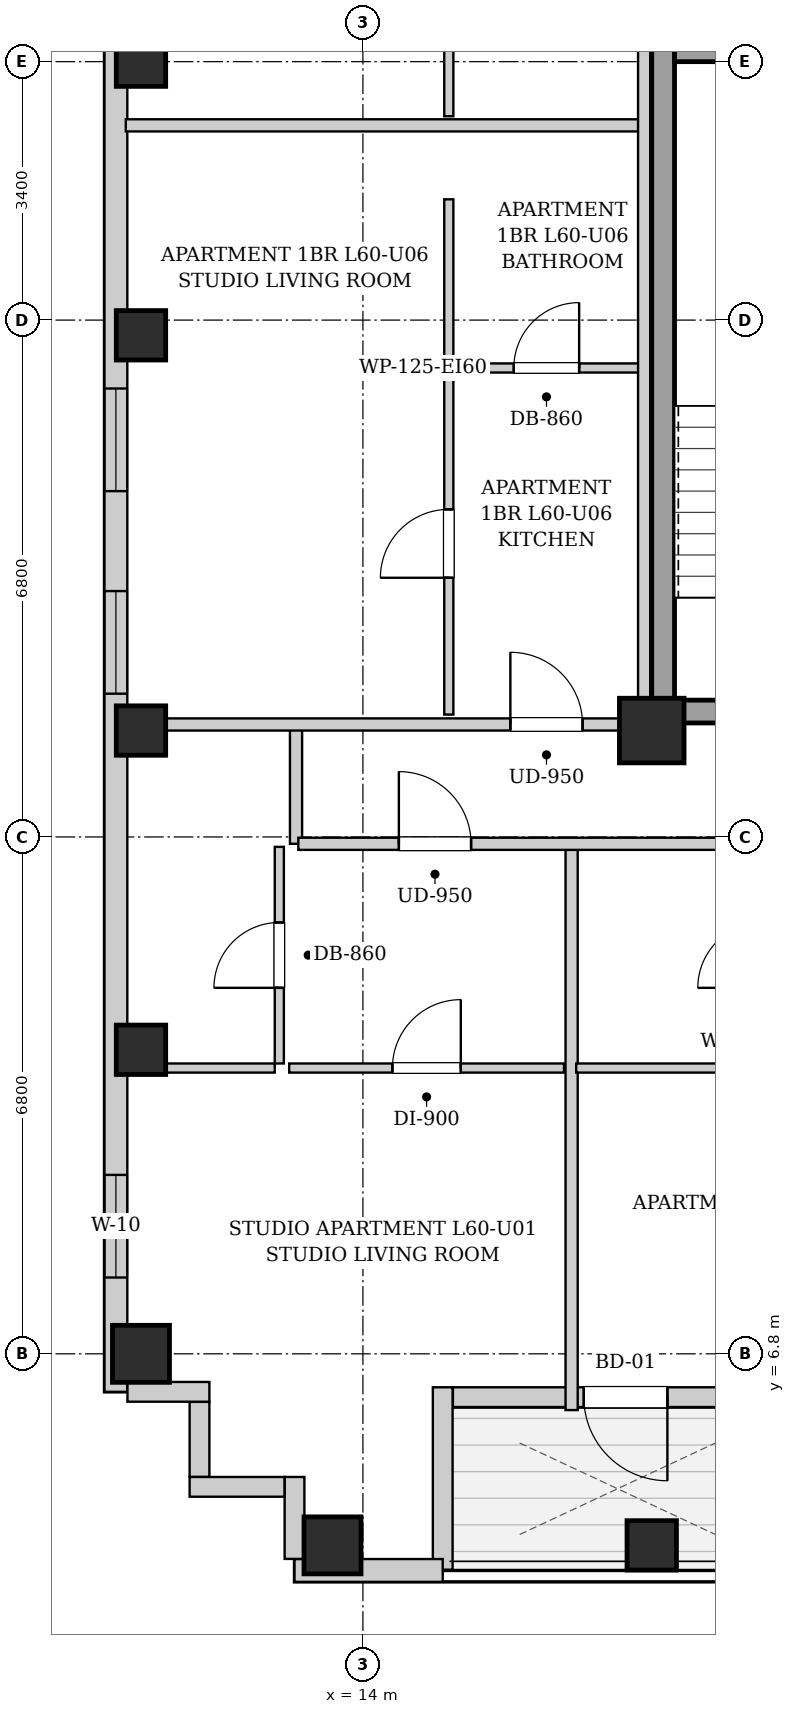
"""IFC4 building model, lengths in metres.
Left out: names, types, materials, properties, quantities, classifications, styles, units other than length and angle.
Written with IfcOpenShell. Run it as: python <this file> out.ifc"""

import sys

from ifc_helpers import new_model, si_unit, direction, frame, frame_2d, origin, origin_2d, place, context, subcontext, project, spatial, rectangle, extrude, element, fill, save


model = new_model("IFC4")
c1 = context("Model", 3, precision=1e-05, world=origin(), true_north=direction((0.0, 1.0)))
c2 = subcontext(c1, "Body", "Model", "MODEL_VIEW")
j1 = project(units=[si_unit("LENGTHUNIT", "METRE"), si_unit("PLANEANGLEUNIT", "RADIAN")], contexts=[c1])
p1 = place(None, origin())
s1 = spatial("IfcSite", under=j1, at=p1, CompositionType="ELEMENT")
p2 = place(p1, origin())
s2 = spatial("IfcBuilding", under=s1, at=p2, CompositionType="ELEMENT")
p3 = place(p2, frame((0.0, 0.0, 207.4)))
s3 = spatial("IfcBuildingStorey", under=s2, at=p3, CompositionType="ELEMENT", Elevation=207.4)
p4 = place(p3, frame((13.6, 4.28, 0.0), z_axis=(0.0, 0.0, 1.0), x_axis=(1.0, 0.0, 0.0)))
e1 = element("IfcColumn", 1, at=p4, inside=s3, PredefinedType="COLUMN", context=c2, shape_type="SweptSolid", body=[
    extrude(rectangle(XDim=0.75, YDim=0.75, at=origin_2d()), origin(), (0.0, 0.0, 1.0), 3.3),
])
p5 = place(p3, frame((17.8, 4.28, 0.0), z_axis=(0.0, 0.0, 1.0), x_axis=(1.0, 0.0, 0.0)))
e2 = element("IfcColumn", 2, at=p5, inside=s3, PredefinedType="COLUMN", context=c2, shape_type="SweptSolid", body=[
    extrude(rectangle(XDim=0.65, YDim=0.65, at=origin_2d()), origin(), (0.0, 0.0, 1.0), 3.3),
])
p6 = place(p3, frame((11.08, 6.8, 0.0), z_axis=(0.0, 0.0, 1.0), x_axis=(1.0, 0.0, 0.0)))
e3 = element("IfcColumn", 3, at=p6, inside=s3, PredefinedType="COLUMN", context=c2, shape_type="SweptSolid", body=[
    extrude(rectangle(XDim=0.75, YDim=0.75, at=origin_2d()), origin(), (0.0, 0.0, 1.0), 3.3),
])
for number, where, z_axis, x_axis in (
    (4, (11.08, 10.8, 0.0), (0.0, 0.0, 1.0), (1.0, 0.0, 0.0)),
    (5, (11.08, 15.0, 0.0), (0.0, 0.0, 1.0), (1.0, 0.0, 0.0)),
    (6, (11.08, 20.2, 0.0), (0.0, 0.0, 1.0), (1.0, 0.0, 0.0)),
    (7, (11.08, 23.8, 0.0), (0.0, 0.0, 1.0), (1.0, 0.0, 0.0)),
):
    element("IfcColumn", number, at=place(p3, frame(where, z_axis=z_axis, x_axis=x_axis)), inside=s3, PredefinedType="COLUMN", context=c2, shape_type="SweptSolid", body=[
        extrude(rectangle(XDim=0.65, YDim=0.65, at=origin_2d()), origin(), (0.0, 0.0, 1.0), 3.3),
    ])
p7 = place(p3, frame((17.8, 15.0, 0.0), z_axis=(0.0, 0.0, 1.0), x_axis=(1.0, 0.0, 0.0)))
e8 = element("IfcColumn", 8, at=p7, inside=s3, PredefinedType="COLUMN", context=c2, shape_type="SweptSolid", body=[
    extrude(rectangle(XDim=0.85, YDim=0.85, at=origin_2d()), origin(), (0.0, 0.0, 1.0), 3.3),
])
p8 = place(p3, frame((19.516, 6.23, 0.0), z_axis=(0.0, 0.0, 1.0), x_axis=(-1.0, 0.0, 0.0)))
e9 = element("IfcWall", 9, at=p8, inside=s3, PredefinedType="SOLIDWALL", context=c2, shape_type="SweptSolid", body=[
    extrude(rectangle(XDim=4.332, YDim=0.26, at=frame_2d((2.166, 0.0))), origin(), (0.0, 0.0, 1.0), 3.04),
])
p9 = place(p8, frame((1.51, 0.0, 0.0)))
e10 = element("IfcOpeningElement", 10, at=p9, cuts=e9, PredefinedType="OPENING", context=c2, shape_type="SweptSolid", body=[
    extrude(rectangle(XDim=1.1, YDim=2.0, at=frame_2d((0.55, 1.0))), frame((0.0, 0.14, 0.0), z_axis=(0.0, -1.0, 0.0), x_axis=(1.0, 0.0, 0.0)), (0.0, 0.0, 1.0), 0.28),
])
p10 = place(p3, frame((15.05, 6.36, 0.0), z_axis=(0.0, 0.0, 1.0), x_axis=(0.0, -1.0, 0.0)))
e11 = element("IfcWall", 11, at=p10, inside=s3, PredefinedType="SOLIDWALL", context=c2, shape_type="SweptSolid", body=[
    extrude(rectangle(XDim=2.4, YDim=0.26, at=frame_2d((1.2, 0.0))), origin(), (0.0, 0.0, 1.0), 3.04),
])
p11 = place(p3, frame((15.05, 3.95, 0.0), z_axis=(0.0, 0.0, 1.0), x_axis=(-1.0, 0.0, 0.0)))
e12 = element("IfcWall", 12, at=p11, inside=s3, PredefinedType="SOLIDWALL", context=c2, shape_type="SweptSolid", body=[
    extrude(rectangle(XDim=1.95, YDim=0.3, at=frame_2d((0.975, 0.0))), origin(), (0.0, 0.0, 1.0), 3.04),
])
p12 = place(p3, frame((10.75, 6.3, 0.0), z_axis=(0.0, 0.0, 1.0), x_axis=(0.0, 1.0, 0.0)))
e13 = element("IfcWall", 13, at=p12, inside=s3, PredefinedType="SOLIDWALL", context=c2, shape_type="SweptSolid", body=[
    extrude(rectangle(XDim=31.4, YDim=0.3, at=frame_2d((15.7, 0.0))), origin(), (0.0, 0.0, 1.0), 3.04),
])
p13 = place(p12, frame((1.504, 0.0, 0.55)))
e14 = element("IfcOpeningElement", 14, at=p13, cuts=e13, PredefinedType="OPENING", context=c2, shape_type="SweptSolid", body=[
    extrude(rectangle(XDim=1.35, YDim=1.2, at=frame_2d((0.675, 0.6))), frame((0.0, 0.16, 0.0), z_axis=(0.0, -1.0, 0.0), x_axis=(1.0, 0.0, 0.0)), (0.0, 0.0, 1.0), 0.32),
])
p14 = place(p12, frame((28.546, 0.0, 0.55)))
e15 = element("IfcOpeningElement", 15, at=p14, cuts=e13, PredefinedType="OPENING", context=c2, shape_type="SweptSolid", body=[
    extrude(rectangle(XDim=1.35, YDim=1.2, at=frame_2d((0.675, 0.6))), frame((0.0, 0.16, 0.0), z_axis=(0.0, -1.0, 0.0), x_axis=(1.0, 0.0, 0.0)), (0.0, 0.0, 1.0), 0.32),
])
p15 = place(p12, frame((11.85, 0.0, 0.55)))
e16 = element("IfcOpeningElement", 16, at=p15, cuts=e13, PredefinedType="OPENING", context=c2, shape_type="SweptSolid", body=[
    extrude(rectangle(XDim=1.35, YDim=1.2, at=frame_2d((0.675, 0.6))), frame((0.0, 0.16, 0.0), z_axis=(0.0, -1.0, 0.0), x_axis=(1.0, 0.0, 0.0)), (0.0, 0.0, 1.0), 0.32),
])
p16 = place(p12, frame((9.185, 0.0, 0.55)))
e17 = element("IfcOpeningElement", 17, at=p16, cuts=e13, PredefinedType="OPENING", context=c2, shape_type="SweptSolid", body=[
    extrude(rectangle(XDim=1.35, YDim=1.2, at=frame_2d((0.675, 0.6))), frame((0.0, 0.16, 0.0), z_axis=(0.0, -1.0, 0.0), x_axis=(1.0, 0.0, 0.0)), (0.0, 0.0, 1.0), 0.32),
])
p17 = place(p12, frame((19.006, 0.0, 0.55)))
e18 = element("IfcOpeningElement", 18, at=p17, cuts=e13, PredefinedType="OPENING", context=c2, shape_type="SweptSolid", body=[
    extrude(rectangle(XDim=1.35, YDim=1.2, at=frame_2d((0.675, 0.6))), frame((0.0, 0.16, 0.0), z_axis=(0.0, -1.0, 0.0), x_axis=(1.0, 0.0, 0.0)), (0.0, 0.0, 1.0), 0.32),
])
p18 = place(p12, frame((20.616, 0.0, 0.55)))
e19 = element("IfcOpeningElement", 19, at=p18, cuts=e13, PredefinedType="OPENING", context=c2, shape_type="SweptSolid", body=[
    extrude(rectangle(XDim=1.35, YDim=1.2, at=frame_2d((0.675, 0.6))), frame((0.0, 0.16, 0.0), z_axis=(0.0, -1.0, 0.0), x_axis=(1.0, 0.0, 0.0)), (0.0, 0.0, 1.0), 0.32),
])
p19 = place(p3, frame((13.1, 4.102, 0.0), z_axis=(0.0, 0.0, 1.0), x_axis=(0.0, 1.0, 0.0)))
e20 = element("IfcWall", 20, at=p19, inside=s3, PredefinedType="SOLIDWALL", context=c2, shape_type="SweptSolid", body=[
    extrude(rectangle(XDim=1.078, YDim=0.26, at=frame_2d((0.539, 0.0))), origin(), (0.0, 0.0, 1.0), 3.04),
])
p20 = place(p3, frame((12.968, 5.05, 0.0), z_axis=(0.0, 0.0, 1.0), x_axis=(-1.0, 0.0, 0.0)))
e21 = element("IfcWall", 21, at=p20, inside=s3, PredefinedType="SOLIDWALL", context=c2, shape_type="SweptSolid", body=[
    extrude(rectangle(XDim=1.248, YDim=0.26, at=frame_2d((0.624, 0.0))), origin(), (0.0, 0.0, 1.0), 3.04),
])
p21 = place(p3, frame((11.85, 5.182, 0.0), z_axis=(0.0, 0.0, 1.0), x_axis=(0.0, 1.0, 0.0)))
e22 = element("IfcWall", 22, at=p21, inside=s3, PredefinedType="SOLIDWALL", context=c2, shape_type="SweptSolid", body=[
    extrude(rectangle(XDim=0.986, YDim=0.26, at=frame_2d((0.493, 0.0))), origin(), (0.0, 0.0, 1.0), 3.04),
])
p22 = place(p3, frame((11.98, 6.3, 0.0), z_axis=(0.0, 0.0, 1.0), x_axis=(-1.0, 0.0, 0.0)))
e23 = element("IfcWall", 23, at=p22, inside=s3, PredefinedType="SOLIDWALL", context=c2, shape_type="SweptSolid", body=[
    extrude(rectangle(XDim=1.078, YDim=0.26, at=frame_2d((0.539, 0.0))), origin(), (0.0, 0.0, 1.0), 3.04),
])
p23 = place(p3, frame((17.95, 15.1, 0.0), z_axis=(0.0, 0.0, 1.0), x_axis=(0.0, 1.0, 0.0)))
e24 = element("IfcWall", 24, at=p23, inside=s3, PredefinedType="SHEAR", context=c2, shape_type="SweptSolid", body=[
    extrude(rectangle(XDim=9.0, YDim=0.3, at=frame_2d((4.5, 0.0))), origin(), (0.0, 0.0, 1.0), 3.04),
])
p24 = place(p3, frame((18.1, 23.95, 0.0), z_axis=(0.0, 0.0, 1.0), x_axis=(1.0, 0.0, 0.0)))
e25 = element("IfcWall", 25, at=p24, inside=s3, PredefinedType="SHEAR", context=c2, shape_type="SweptSolid", body=[
    extrude(rectangle(XDim=2.85, YDim=0.3, at=frame_2d((1.425, 0.0))), origin(), (0.0, 0.0, 1.0), 3.04),
])
p25 = place(p3, frame((18.1, 15.25, 0.0), z_axis=(0.0, 0.0, 1.0), x_axis=(1.0, 0.0, 0.0)))
e26 = element("IfcWall", 26, at=p25, inside=s3, PredefinedType="SHEAR", context=c2, shape_type="SweptSolid", body=[
    extrude(rectangle(XDim=2.85, YDim=0.3, at=frame_2d((1.425, 0.0))), origin(), (0.0, 0.0, 1.0), 3.04),
])
p26 = place(p25, frame((0.86, 0.0, 0.0)))
e27 = element("IfcOpeningElement", 27, at=p26, cuts=e26, PredefinedType="OPENING", context=c2, shape_type="SweptSolid", body=[
    extrude(rectangle(XDim=1.1, YDim=2.05, at=frame_2d((0.55, 1.025))), frame((0.0, 0.16, 0.0), z_axis=(0.0, -1.0, 0.0), x_axis=(1.0, 0.0, 0.0)), (0.0, 0.0, 1.0), 0.32),
])
p27 = place(p3, frame((13.12, 13.51, 0.0), z_axis=(0.0, 0.0, 1.0), x_axis=(0.0, 1.0, 0.0)))
e28 = element("IfcWall", 28, at=p27, inside=s3, PredefinedType="PARTITIONING", context=c2, shape_type="SweptSolid", body=[
    extrude(rectangle(XDim=1.58, YDim=0.16, at=frame_2d((0.79, 0.0))), origin(), (0.0, 0.0, 1.0), 3.04),
])
p28 = place(p3, frame((12.9, 10.62, 0.0), z_axis=(0.0, 0.0, 1.0), x_axis=(0.0, 1.0, 0.0)))
e29 = element("IfcWall", 29, at=p28, inside=s3, PredefinedType="PARTITIONING", context=c2, shape_type="SweptSolid", body=[
    extrude(rectangle(XDim=2.85, YDim=0.12, at=frame_2d((1.425, 0.0))), origin(), (0.0, 0.0, 1.0), 3.04),
])
p29 = place(p28, frame((0.995, 0.0, 0.0)))
e30 = element("IfcOpeningElement", 30, at=p29, cuts=e29, PredefinedType="OPENING", context=c2, shape_type="SweptSolid", body=[
    extrude(rectangle(XDim=0.86, YDim=2.05, at=frame_2d((0.43, 1.025))), frame((0.0, 0.07, 0.0), z_axis=(0.0, -1.0, 0.0), x_axis=(1.0, 0.0, 0.0)), (0.0, 0.0, 1.0), 0.14),
])
p30 = place(p3, frame((10.99, 10.56, 0.0), z_axis=(0.0, 0.0, 1.0), x_axis=(1.0, 0.0, 0.0)))
e31 = element("IfcWall", 31, at=p30, inside=s3, PredefinedType="PARTITIONING", context=c2, shape_type="SweptSolid", body=[
    extrude(rectangle(XDim=1.85, YDim=0.12, at=frame_2d((0.925, 0.0))), origin(), (0.0, 0.0, 1.0), 3.04),
])
p31 = place(p3, frame((13.03, 10.56, 0.0), z_axis=(0.0, 0.0, 1.0), x_axis=(1.0, 0.0, 0.0)))
e32 = element("IfcWall", 32, at=p31, inside=s3, PredefinedType="PARTITIONING", context=c2, shape_type="SweptSolid", body=[
    extrude(rectangle(XDim=3.616, YDim=0.12, at=frame_2d((1.808, 0.0))), origin(), (0.0, 0.0, 1.0), 3.04),
])
p32 = place(p31, frame((1.358, 0.0, 0.0)))
e33 = element("IfcOpeningElement", 33, at=p32, cuts=e32, PredefinedType="OPENING", context=c2, shape_type="SweptSolid", body=[
    extrude(rectangle(XDim=0.9, YDim=2.05, at=frame_2d((0.45, 1.025))), frame((0.0, 0.07, 0.0), z_axis=(0.0, -1.0, 0.0), x_axis=(1.0, 0.0, 0.0)), (0.0, 0.0, 1.0), 0.14),
])
p33 = place(p3, frame((16.746, 6.06, 0.0), z_axis=(0.0, 0.0, 1.0), x_axis=(0.0, 1.0, 0.0)))
e34 = element("IfcWall", 34, at=p33, inside=s3, PredefinedType="PARTITIONING", context=c2, shape_type="SweptSolid", body=[
    extrude(rectangle(XDim=7.41, YDim=0.16, at=frame_2d((3.705, 0.0))), origin(), (0.0, 0.0, 1.0), 3.04),
])
p34 = place(p3, frame((16.806, 10.56, 0.0), z_axis=(0.0, 0.0, 1.0), x_axis=(1.0, 0.0, 0.0)))
e35 = element("IfcWall", 35, at=p34, inside=s3, PredefinedType="PARTITIONING", context=c2, shape_type="SweptSolid", body=[
    extrude(rectangle(XDim=2.4, YDim=0.12, at=frame_2d((1.2, 0.0))), origin(), (0.0, 0.0, 1.0), 3.04),
])
p35 = place(p3, frame((10.88, 15.08, 0.0), z_axis=(0.0, 0.0, 1.0), x_axis=(1.0, 0.0, 0.0)))
e36 = element("IfcWall", 36, at=p35, inside=s3, PredefinedType="PARTITIONING", context=c2, shape_type="SweptSolid", body=[
    extrude(rectangle(XDim=6.88, YDim=0.16, at=frame_2d((3.44, 0.0))), origin(), (0.0, 0.0, 1.0), 2.556),
])
p36 = place(p35, frame((5.06, 0.0, 0.0)))
e37 = element("IfcOpeningElement", 37, at=p36, cuts=e36, PredefinedType="OPENING", context=c2, shape_type="SweptSolid", body=[
    extrude(rectangle(XDim=0.95, YDim=2.1, at=frame_2d((0.475, 1.05))), frame((0.0, 0.09, 0.0), z_axis=(0.0, -1.0, 0.0), x_axis=(1.0, 0.0, 0.0)), (0.0, 0.0, 1.0), 0.18),
])
p37 = place(p3, frame((10.88, 22.962, 0.0), z_axis=(0.0, 0.0, 1.0), x_axis=(1.0, 0.0, 0.0)))
e38 = element("IfcWall", 38, at=p37, inside=s3, PredefinedType="PARTITIONING", context=c2, shape_type="SweptSolid", body=[
    extrude(rectangle(XDim=6.76, YDim=0.16, at=frame_2d((3.38, 0.0))), origin(), (0.0, 0.0, 1.0), 3.04),
])
p38 = place(p3, frame((15.19, 19.77, 0.0), z_axis=(0.0, 0.0, 1.0), x_axis=(1.0, 0.0, 0.0)))
e39 = element("IfcWall", 39, at=p38, inside=s3, PredefinedType="PARTITIONING", context=c2, shape_type="SweptSolid", body=[
    extrude(rectangle(XDim=2.45, YDim=0.12, at=frame_2d((1.225, 0.0))), origin(), (0.0, 0.0, 1.0), 3.04),
])
p39 = place(p38, frame((0.795, 0.0, 0.0)))
e40 = element("IfcOpeningElement", 40, at=p39, cuts=e39, PredefinedType="OPENING", context=c2, shape_type="SweptSolid", body=[
    extrude(rectangle(XDim=0.86, YDim=2.05, at=frame_2d((0.43, 1.025))), frame((0.0, 0.07, 0.0), z_axis=(0.0, -1.0, 0.0), x_axis=(1.0, 0.0, 0.0)), (0.0, 0.0, 1.0), 0.14),
])
p40 = place(p3, frame((15.13, 19.83, 0.0), z_axis=(0.0, 0.0, 1.0), x_axis=(0.0, 1.0, 0.0)))
e41 = element("IfcWall", 41, at=p40, inside=s3, PredefinedType="PARTITIONING", context=c2, shape_type="SweptSolid", body=[
    extrude(rectangle(XDim=2.159, YDim=0.12, at=frame_2d((1.08, 0.0))), origin(), (0.0, 0.0, 1.0), 3.04),
])
p41 = place(p3, frame((15.13, 15.21, 0.0), z_axis=(0.0, 0.0, 1.0), x_axis=(0.0, 1.0, 0.0)))
e42 = element("IfcWall", 42, at=p41, inside=s3, PredefinedType="PARTITIONING", context=c2, shape_type="SweptSolid", body=[
    extrude(rectangle(XDim=4.5, YDim=0.12, at=frame_2d((2.25, 0.0))), origin(), (0.0, 0.0, 1.0), 3.04),
])
p42 = place(p41, frame((1.8, 0.0, 0.0)))
e43 = element("IfcOpeningElement", 43, at=p42, cuts=e42, PredefinedType="OPENING", context=c2, shape_type="SweptSolid", body=[
    extrude(rectangle(XDim=0.9, YDim=2.05, at=frame_2d((0.45, 1.025))), frame((0.0, 0.07, 0.0), z_axis=(0.0, -1.0, 0.0), x_axis=(1.0, 0.0, 0.0)), (0.0, 0.0, 1.0), 0.14),
])
p43 = place(p3, frame((15.13, 23.082, 0.0), z_axis=(0.0, 0.0, 1.0), x_axis=(0.0, 1.0, 0.0)))
e44 = element("IfcWall", 44, at=p43, inside=s3, PredefinedType="PARTITIONING", context=c2, shape_type="SweptSolid", body=[
    extrude(rectangle(XDim=1.85, YDim=0.12, at=frame_2d((0.925, 0.0))), origin(), (0.0, 0.0, 1.0), 3.04),
])
p44 = place(p3, frame((13.15, 13.51, 0.0), z_axis=(0.0, 0.0, 1.0), x_axis=(1.0, 0.0, 0.0)))
e45 = element("IfcWall", 45, at=p44, inside=s3, PredefinedType="PARTITIONING", context=c2, shape_type="SweptSolid", body=[
    extrude(rectangle(XDim=24.6, YDim=0.16, at=frame_2d((12.3, 0.0))), origin(), (0.0, 0.0, 1.0), 3.04),
])
p45 = place(p44, frame((1.323, 0.0, 0.0)))
e46 = element("IfcOpeningElement", 46, at=p45, cuts=e45, PredefinedType="OPENING", context=c2, shape_type="SweptSolid", body=[
    extrude(rectangle(XDim=0.95, YDim=2.1, at=frame_2d((0.475, 1.05))), frame((0.0, 0.09, 0.0), z_axis=(0.0, -1.0, 0.0), x_axis=(1.0, 0.0, 0.0)), (0.0, 0.0, 1.0), 0.18),
])
p46 = place(p44, frame((8.585, 0.0, 0.0)))
e47 = element("IfcOpeningElement", 47, at=p46, cuts=e45, PredefinedType="OPENING", context=c2, shape_type="SweptSolid", body=[
    extrude(rectangle(XDim=0.95, YDim=2.1, at=frame_2d((0.475, 1.05))), frame((0.0, 0.09, 0.0), z_axis=(0.0, -1.0, 0.0), x_axis=(1.0, 0.0, 0.0)), (0.0, 0.0, 1.0), 0.18),
])
p47 = place(p44, frame((21.889, 0.0, 0.0)))
e48 = element("IfcOpeningElement", 48, at=p47, cuts=e45, PredefinedType="OPENING", context=c2, shape_type="SweptSolid", body=[
    extrude(rectangle(XDim=0.95, YDim=2.1, at=frame_2d((0.475, 1.05))), frame((0.0, 0.09, 0.0), z_axis=(0.0, -1.0, 0.0), x_axis=(1.0, 0.0, 0.0)), (0.0, 0.0, 1.0), 0.18),
])
p48 = place(p3, frame((17.7, 15.02, 0.0), z_axis=(0.0, 0.0, 1.0), x_axis=(0.0, 1.0, 0.0)))
e49 = element("IfcWall", 49, at=p48, inside=s3, PredefinedType="PARTITIONING", context=c2, shape_type="SweptSolid", body=[
    extrude(rectangle(XDim=13.98, YDim=0.16, at=frame_2d((6.99, 0.0))), origin(), (0.0, 0.0, 1.0), 2.375),
])
p49 = place(p29, origin())
e50 = element("IfcDoor", 50, at=p49, inside=s3, OperationType="SINGLE_SWING_LEFT", PredefinedType="DOOR", context=c2, shape_type="SweptSolid", body=[
    extrude(rectangle(XDim=0.86, YDim=2.05, at=frame_2d((0.43, 1.025))), frame((0.0, 0.025, 0.0), z_axis=(0.0, -1.0, 0.0), x_axis=(1.0, 0.0, 0.0)), (0.0, 0.0, 1.0), 0.05),
])
fill(e30, e50)
p50 = place(p32, origin())
e51 = element("IfcDoor", 51, at=p50, inside=s3, OperationType="SINGLE_SWING_RIGHT", PredefinedType="DOOR", context=c2, shape_type="SweptSolid", body=[
    extrude(rectangle(XDim=0.9, YDim=2.05, at=frame_2d((0.45, 1.025))), frame((0.0, 0.025, 0.0), z_axis=(0.0, -1.0, 0.0), x_axis=(1.0, 0.0, 0.0)), (0.0, 0.0, 1.0), 0.05),
])
fill(e33, e51)
p51 = place(p36, origin())
e52 = element("IfcDoor", 52, at=p51, inside=s3, OperationType="SINGLE_SWING_LEFT", PredefinedType="DOOR", context=c2, shape_type="SweptSolid", body=[
    extrude(rectangle(XDim=0.95, YDim=2.1, at=frame_2d((0.475, 1.05))), frame((0.0, 0.025, 0.0), z_axis=(0.0, -1.0, 0.0), x_axis=(1.0, 0.0, 0.0)), (0.0, 0.0, 1.0), 0.05),
])
fill(e37, e52)
p52 = place(p39, origin())
e53 = element("IfcDoor", 53, at=p52, inside=s3, OperationType="SINGLE_SWING_RIGHT", PredefinedType="DOOR", context=c2, shape_type="SweptSolid", body=[
    extrude(rectangle(XDim=0.86, YDim=2.05, at=frame_2d((0.43, 1.025))), frame((0.0, 0.025, 0.0), z_axis=(0.0, -1.0, 0.0), x_axis=(1.0, 0.0, 0.0)), (0.0, 0.0, 1.0), 0.05),
])
fill(e40, e53)
p53 = place(p42, origin())
e54 = element("IfcDoor", 54, at=p53, inside=s3, OperationType="SINGLE_SWING_LEFT", PredefinedType="DOOR", context=c2, shape_type="SweptSolid", body=[
    extrude(rectangle(XDim=0.9, YDim=2.05, at=frame_2d((0.45, 1.025))), frame((0.0, 0.025, 0.0), z_axis=(0.0, -1.0, 0.0), x_axis=(1.0, 0.0, 0.0)), (0.0, 0.0, 1.0), 0.05),
])
fill(e43, e54)
p54 = place(p45, origin())
e55 = element("IfcDoor", 55, at=p54, inside=s3, OperationType="SINGLE_SWING_LEFT", PredefinedType="DOOR", context=c2, shape_type="SweptSolid", body=[
    extrude(rectangle(XDim=0.95, YDim=2.1, at=frame_2d((0.475, 1.05))), frame((0.0, 0.025, 0.0), z_axis=(0.0, -1.0, 0.0), x_axis=(1.0, 0.0, 0.0)), (0.0, 0.0, 1.0), 0.05),
])
fill(e46, e55)
p55 = place(p9, origin())
e56 = element("IfcDoor", 56, at=p55, inside=s3, OperationType="SINGLE_SWING_LEFT", PredefinedType="DOOR", context=c2, shape_type="SweptSolid", body=[
    extrude(rectangle(XDim=1.1, YDim=2.0, at=frame_2d((0.55, 1.0))), frame((0.0, 0.025, 0.0), z_axis=(0.0, -1.0, 0.0), x_axis=(1.0, 0.0, 0.0)), (0.0, 0.0, 1.0), 0.05),
])
fill(e10, e56)
p56 = place(p13, origin())
e57 = element("IfcWindow", 57, at=p56, inside=s3, PartitioningType="SINGLE_PANEL", PredefinedType="WINDOW", context=c2, shape_type="SweptSolid", body=[
    extrude(rectangle(XDim=1.35, YDim=1.2, at=frame_2d((0.675, 0.6))), frame((0.0, 0.03, 0.0), z_axis=(0.0, -1.0, 0.0), x_axis=(1.0, 0.0, 0.0)), (0.0, 0.0, 1.0), 0.06),
])
fill(e14, e57)
p57 = place(p15, origin())
e58 = element("IfcWindow", 58, at=p57, inside=s3, PartitioningType="SINGLE_PANEL", PredefinedType="WINDOW", context=c2, shape_type="SweptSolid", body=[
    extrude(rectangle(XDim=1.35, YDim=1.2, at=frame_2d((0.675, 0.6))), frame((0.0, 0.03, 0.0), z_axis=(0.0, -1.0, 0.0), x_axis=(1.0, 0.0, 0.0)), (0.0, 0.0, 1.0), 0.06),
])
fill(e16, e58)
p58 = place(p16, origin())
e59 = element("IfcWindow", 59, at=p58, inside=s3, PartitioningType="SINGLE_PANEL", PredefinedType="WINDOW", context=c2, shape_type="SweptSolid", body=[
    extrude(rectangle(XDim=1.35, YDim=1.2, at=frame_2d((0.675, 0.6))), frame((0.0, 0.03, 0.0), z_axis=(0.0, -1.0, 0.0), x_axis=(1.0, 0.0, 0.0)), (0.0, 0.0, 1.0), 0.06),
])
fill(e17, e59)
save(model, sys.argv[1])
